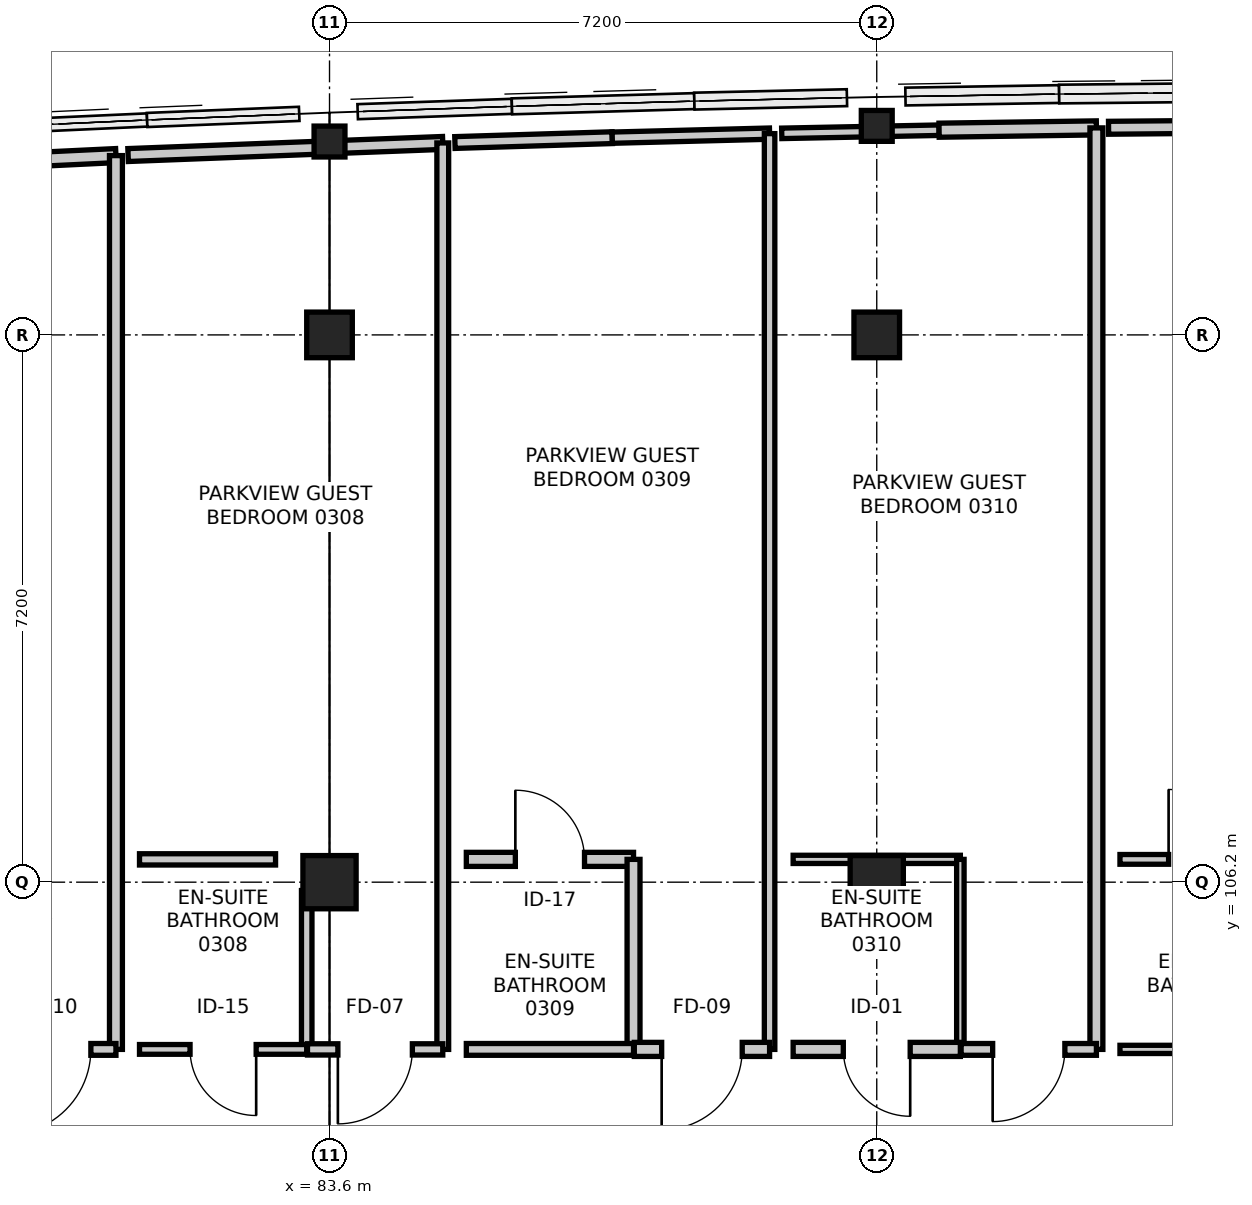
"""IFC4 building model, lengths in metres.
Left out: names, types, materials, properties, quantities, classifications, styles, units other than length and angle.
Written with IfcOpenShell. Run it as: python <this file> out.ifc"""

import sys

from ifc_helpers import new_model, si_unit, direction, frame, frame_2d, origin, origin_2d, place, context, subcontext, project, spatial, rectangle, hollow_circle, extrude, element, fill, save


model = new_model("IFC4")
c1 = context("Model", 3, precision=1e-05, world=origin(), true_north=direction((0.0, 1.0)))
c2 = subcontext(c1, "Body", "Model", "MODEL_VIEW")
j1 = project(units=[si_unit("LENGTHUNIT", "METRE"), si_unit("PLANEANGLEUNIT", "RADIAN")], contexts=[c1])
p1 = place(None, origin())
s1 = spatial("IfcSite", under=j1, at=p1, CompositionType="ELEMENT")
p2 = place(p1, origin())
s2 = spatial("IfcBuilding", under=s1, at=p2, CompositionType="ELEMENT")
p3 = place(p2, frame((0.0, 0.0, 15.0)))
s3 = spatial("IfcBuildingStorey", under=s2, at=p3, CompositionType="ELEMENT", Elevation=15.0)
p4 = place(p3, frame((83.6, 106.2, 0.0), z_axis=(0.0, 0.0, 1.0), x_axis=(1.0, 0.0, 0.0)))
e1 = element("IfcColumn", 1, at=p4, inside=s3, PredefinedType="COLUMN", context=c2, shape_type="SweptSolid", body=[
    extrude(rectangle(XDim=0.7, YDim=0.7, at=origin_2d()), origin(), (0.0, 0.0, 1.0), 4.2),
])
p5 = place(p3, frame((83.6, 113.4, 0.0), z_axis=(0.0, 0.0, 1.0), x_axis=(1.0, 0.0, 0.0)))
e2 = element("IfcColumn", 2, at=p5, inside=s3, PredefinedType="COLUMN", context=c2, shape_type="SweptSolid", body=[
    extrude(rectangle(XDim=0.6, YDim=0.6, at=origin_2d()), origin(), (0.0, 0.0, 1.0), 4.2),
])
p6 = place(p3, frame((83.6, 115.944, 0.0), z_axis=(0.0, 0.0, 1.0), x_axis=(1.0, 0.0, 0.0)))
e3 = element("IfcColumn", 3, at=p6, inside=s3, PredefinedType="COLUMN", context=c2, shape_type="SweptSolid", body=[
    extrude(hollow_circle(Radius=0.203, WallThickness=0.02, at=origin_2d()), origin(), (0.0, 0.0, 1.0), 4.2),
])
p7 = place(p3, frame((90.8, 106.2, 0.0), z_axis=(0.0, 0.0, 1.0), x_axis=(1.0, 0.0, 0.0)))
e4 = element("IfcColumn", 4, at=p7, inside=s3, PredefinedType="COLUMN", context=c2, shape_type="SweptSolid", body=[
    extrude(rectangle(XDim=0.7, YDim=0.7, at=origin_2d()), origin(), (0.0, 0.0, 1.0), 4.2),
])
p8 = place(p3, frame((90.8, 113.4, 0.0), z_axis=(0.0, 0.0, 1.0), x_axis=(1.0, 0.0, 0.0)))
e5 = element("IfcColumn", 5, at=p8, inside=s3, PredefinedType="COLUMN", context=c2, shape_type="SweptSolid", body=[
    extrude(rectangle(XDim=0.6, YDim=0.6, at=origin_2d()), origin(), (0.0, 0.0, 1.0), 4.2),
])
p9 = place(p3, frame((90.8, 116.15, 0.0), z_axis=(0.0, 0.0, 1.0), x_axis=(1.0, 0.0, 0.0)))
e6 = element("IfcColumn", 6, at=p9, inside=s3, PredefinedType="COLUMN", context=c2, shape_type="SweptSolid", body=[
    extrude(hollow_circle(Radius=0.203, WallThickness=0.02, at=origin_2d()), origin(), (0.0, 0.0, 1.0), 4.2),
])
p10 = place(p3, frame((77.01, 115.577, 0.0), z_axis=(0.0, 0.0, 1.0), x_axis=(0.998847761626, 0.047991135592, 0.0)))
e7 = element("IfcWall", 7, at=p10, inside=s3, PredefinedType="PARTITIONING", context=c2, shape_type="SweptSolid", body=[
    extrude(rectangle(XDim=3.785, YDim=0.185, at=frame_2d((1.893, 0.0))), origin(), (0.0, 0.0, 1.0), 3.516),
])
p11 = place(p3, frame((80.79, 115.759, 0.0), z_axis=(0.0, 0.0, 1.0), x_axis=(0.0, -1.0, 0.0)))
e8 = element("IfcWall", 8, at=p11, inside=s3, PredefinedType="PARTITIONING", context=c2, shape_type="SweptSolid", body=[
    extrude(rectangle(XDim=11.759, YDim=0.17, at=frame_2d((5.879, 0.0))), origin(), (0.0, 0.0, 1.0), 3.325),
])
p12 = place(p3, frame((80.79, 104.0, 0.0), z_axis=(0.0, 0.0, 1.0), x_axis=(-1.0, 0.0, 0.0)))
e9 = element("IfcWall", 9, at=p12, inside=s3, PredefinedType="PARTITIONING", context=c2, shape_type="SweptSolid", body=[
    extrude(rectangle(XDim=1.78, YDim=0.155, at=frame_2d((0.89, 0.0))), origin(), (0.0, 0.0, 1.0), 3.94),
])
p13 = place(p12, frame((0.33, 0.0, 0.0)))
e10 = element("IfcOpeningElement", 10, at=p13, cuts=e9, PredefinedType="OPENING", context=c2, shape_type="SweptSolid", body=[
    extrude(rectangle(XDim=1.12, YDim=2.2, at=frame_2d((0.56, 1.1))), frame((0.0, 0.087, 0.0), z_axis=(0.0, -1.0, 0.0), x_axis=(1.0, 0.0, 0.0)), (0.0, 0.0, 1.0), 0.175),
])
p14 = place(p3, frame((81.1, 106.5, 0.0), z_axis=(0.0, 0.0, 1.0), x_axis=(1.0, 0.0, 0.0)))
e11 = element("IfcWall", 11, at=p14, inside=s3, PredefinedType="PARTITIONING", context=c2, shape_type="SweptSolid", body=[
    extrude(rectangle(XDim=1.79, YDim=0.148, at=frame_2d((0.895, 0.0))), origin(), (0.0, 0.0, 1.0), 3.94),
])
p15 = place(p3, frame((83.3, 106.09, 0.0), z_axis=(0.0, 0.0, 1.0), x_axis=(0.0, -1.0, 0.0)))
e12 = element("IfcWall", 12, at=p15, inside=s3, PredefinedType="PARTITIONING", context=c2, shape_type="SweptSolid", body=[
    extrude(rectangle(XDim=2.09, YDim=0.138, at=frame_2d((1.045, 0.0))), origin(), (0.0, 0.0, 1.0), 3.275),
])
p16 = place(p3, frame((83.3, 104.0, 0.0), z_axis=(0.0, 0.0, 1.0), x_axis=(-1.0, 0.0, 0.0)))
e13 = element("IfcWall", 13, at=p16, inside=s3, PredefinedType="PARTITIONING", context=c2, shape_type="SweptSolid", body=[
    extrude(rectangle(XDim=2.2, YDim=0.128, at=frame_2d((1.1, 0.0))), origin(), (0.0, 0.0, 1.0), 3.94),
])
p17 = place(p16, frame((0.665, 0.0, 0.0)))
e14 = element("IfcOpeningElement", 14, at=p17, cuts=e13, PredefinedType="OPENING", context=c2, shape_type="SweptSolid", body=[
    extrude(rectangle(XDim=0.87, YDim=2.07, at=frame_2d((0.435, 1.035))), frame((0.0, 0.074, 0.0), z_axis=(0.0, -1.0, 0.0), x_axis=(1.0, 0.0, 0.0)), (0.0, 0.0, 1.0), 0.148),
])
p18 = place(p3, frame((80.95, 115.766, 0.0), z_axis=(0.0, 0.0, 1.0), x_axis=(0.999261696776, 0.03841954395, 0.0)))
e15 = element("IfcWall", 15, at=p18, inside=s3, PredefinedType="PARTITIONING", context=c2, shape_type="SweptSolid", body=[
    extrude(rectangle(XDim=4.143, YDim=0.17, at=frame_2d((2.072, 0.0))), origin(), (0.0, 0.0, 1.0), 3.516),
])
p19 = place(p3, frame((85.09, 115.926, 0.0), z_axis=(0.0, 0.0, 1.0), x_axis=(0.0, -1.0, 0.0)))
e16 = element("IfcWall", 16, at=p19, inside=s3, PredefinedType="PARTITIONING", context=c2, shape_type="SweptSolid", body=[
    extrude(rectangle(XDim=11.926, YDim=0.155, at=frame_2d((5.963, 0.0))), origin(), (0.0, 0.0, 1.0), 3.325),
])
p20 = place(p3, frame((85.09, 104.0, 0.0), z_axis=(0.0, 0.0, 1.0), x_axis=(-1.0, 0.0, 0.0)))
e17 = element("IfcWall", 17, at=p20, inside=s3, PredefinedType="PARTITIONING", context=c2, shape_type="SweptSolid", body=[
    extrude(rectangle(XDim=1.78, YDim=0.148, at=frame_2d((0.89, 0.0))), origin(), (0.0, 0.0, 1.0), 3.275),
])
p21 = place(p20, frame((0.4, 0.0, 0.0)))
e18 = element("IfcOpeningElement", 18, at=p21, cuts=e17, PredefinedType="OPENING", context=c2, shape_type="SweptSolid", body=[
    extrude(rectangle(XDim=0.98, YDim=2.15, at=frame_2d((0.49, 1.075))), frame((0.0, 0.084, 0.0), z_axis=(0.0, -1.0, 0.0), x_axis=(1.0, 0.0, 0.0)), (0.0, 0.0, 1.0), 0.168),
])
p22 = place(p3, frame((85.4, 106.5, 0.0), z_axis=(0.0, 0.0, 1.0), x_axis=(1.0, 0.0, 0.0)))
e19 = element("IfcWall", 19, at=p22, inside=s3, PredefinedType="PARTITIONING", context=c2, shape_type="SweptSolid", body=[
    extrude(rectangle(XDim=2.2, YDim=0.185, at=frame_2d((1.1, 0.0))), origin(), (0.0, 0.0, 1.0), 3.325),
])
p23 = place(p22, frame((0.645, 0.0, 0.0)))
e20 = element("IfcOpeningElement", 20, at=p23, cuts=e19, PredefinedType="OPENING", context=c2, shape_type="SweptSolid", body=[
    extrude(rectangle(XDim=0.91, YDim=2.11, at=frame_2d((0.455, 1.055))), frame((0.0, 0.103, 0.0), z_axis=(0.0, -1.0, 0.0), x_axis=(1.0, 0.0, 0.0)), (0.0, 0.0, 1.0), 0.205),
])
p24 = place(p3, frame((87.6, 106.5, 0.0), z_axis=(0.0, 0.0, 1.0), x_axis=(0.0, -1.0, 0.0)))
e21 = element("IfcWall", 21, at=p24, inside=s3, PredefinedType="PARTITIONING", context=c2, shape_type="SweptSolid", body=[
    extrude(rectangle(XDim=2.5, YDim=0.17, at=frame_2d((1.25, 0.0))), origin(), (0.0, 0.0, 1.0), 3.325),
])
p25 = place(p3, frame((87.6, 104.0, 0.0), z_axis=(0.0, 0.0, 1.0), x_axis=(-1.0, 0.0, 0.0)))
e22 = element("IfcWall", 22, at=p25, inside=s3, PredefinedType="PARTITIONING", context=c2, shape_type="SweptSolid", body=[
    extrude(rectangle(XDim=2.2, YDim=0.155, at=frame_2d((1.1, 0.0))), origin(), (0.0, 0.0, 1.0), 3.94),
])
p26 = place(p3, frame((85.25, 115.931, 0.0), z_axis=(0.0, 0.0, 1.0), x_axis=(0.999526572749, 0.030767358826, 0.0)))
e23 = element("IfcWall", 23, at=p26, inside=s3, PredefinedType="PARTITIONING", context=c2, shape_type="SweptSolid", body=[
    extrude(rectangle(XDim=2.071, YDim=0.155, at=frame_2d((1.036, 0.0))), origin(), (0.0, 0.0, 1.0), 3.516),
])
p27 = place(p3, frame((87.32, 115.995, 0.0), z_axis=(0.0, 0.0, 1.0), x_axis=(0.999666532025, 0.025822950049, 0.0)))
e24 = element("IfcWall", 24, at=p27, inside=s3, PredefinedType="PARTITIONING", context=c2, shape_type="SweptSolid", body=[
    extrude(rectangle(XDim=2.071, YDim=0.148, at=frame_2d((1.035, 0.0))), origin(), (0.0, 0.0, 1.0), 3.516),
])
p28 = place(p3, frame((89.39, 116.048, 0.0), z_axis=(0.0, 0.0, 1.0), x_axis=(0.0, -1.0, 0.0)))
e25 = element("IfcWall", 25, at=p28, inside=s3, PredefinedType="PARTITIONING", context=c2, shape_type="SweptSolid", body=[
    extrude(rectangle(XDim=12.048, YDim=0.138, at=frame_2d((6.024, 0.0))), origin(), (0.0, 0.0, 1.0), 3.325),
])
p29 = place(p3, frame((89.39, 104.0, 0.0), z_axis=(0.0, 0.0, 1.0), x_axis=(-1.0, 0.0, 0.0)))
e26 = element("IfcWall", 26, at=p29, inside=s3, PredefinedType="PARTITIONING", context=c2, shape_type="SweptSolid", body=[
    extrude(rectangle(XDim=1.78, YDim=0.185, at=frame_2d((0.89, 0.0))), origin(), (0.0, 0.0, 1.0), 3.94),
])
p30 = place(p29, frame((0.36, 0.0, 0.0)))
e27 = element("IfcOpeningElement", 27, at=p30, cuts=e26, PredefinedType="OPENING", context=c2, shape_type="SweptSolid", body=[
    extrude(rectangle(XDim=1.06, YDim=2.2, at=frame_2d((0.53, 1.1))), frame((0.0, 0.103, 0.0), z_axis=(0.0, -1.0, 0.0), x_axis=(1.0, 0.0, 0.0)), (0.0, 0.0, 1.0), 0.205),
])
p31 = place(p3, frame((89.7, 106.5, 0.0), z_axis=(0.0, 0.0, 1.0), x_axis=(1.0, 0.0, 0.0)))
e28 = element("IfcWall", 28, at=p31, inside=s3, PredefinedType="PARTITIONING", context=c2, shape_type="SweptSolid", body=[
    extrude(rectangle(XDim=2.2, YDim=0.108, at=frame_2d((1.1, 0.0))), origin(), (0.0, 0.0, 1.0), 3.275),
])
p32 = place(p3, frame((91.9, 106.5, 0.0), z_axis=(0.0, 0.0, 1.0), x_axis=(0.0, -1.0, 0.0)))
e29 = element("IfcWall", 29, at=p32, inside=s3, PredefinedType="PARTITIONING", context=c2, shape_type="SweptSolid", body=[
    extrude(rectangle(XDim=2.5, YDim=0.098, at=frame_2d((1.25, 0.0))), origin(), (0.0, 0.0, 1.0), 3.325),
])
p33 = place(p3, frame((91.9, 104.0, 0.0), z_axis=(0.0, 0.0, 1.0), x_axis=(-1.0, 0.0, 0.0)))
e30 = element("IfcWall", 30, at=p33, inside=s3, PredefinedType="PARTITIONING", context=c2, shape_type="SweptSolid", body=[
    extrude(rectangle(XDim=2.2, YDim=0.185, at=frame_2d((1.1, 0.0))), origin(), (0.0, 0.0, 1.0), 3.275),
])
p34 = place(p33, frame((0.66, 0.0, 0.0)))
e31 = element("IfcOpeningElement", 31, at=p34, cuts=e30, PredefinedType="OPENING", context=c2, shape_type="SweptSolid", body=[
    extrude(rectangle(XDim=0.88, YDim=2.06, at=frame_2d((0.44, 1.03))), frame((0.0, 0.103, 0.0), z_axis=(0.0, -1.0, 0.0), x_axis=(1.0, 0.0, 0.0)), (0.0, 0.0, 1.0), 0.205),
])
p35 = place(p3, frame((89.55, 116.052, 0.0), z_axis=(0.0, 0.0, 1.0), x_axis=(0.999799068667, 0.020045505564, 0.0)))
e32 = element("IfcWall", 32, at=p35, inside=s3, PredefinedType="PARTITIONING", context=c2, shape_type="SweptSolid", body=[
    extrude(rectangle(XDim=2.071, YDim=0.138, at=frame_2d((1.035, 0.0))), origin(), (0.0, 0.0, 1.0), 3.516),
])
p36 = place(p3, frame((91.62, 116.093, 0.0), z_axis=(0.0, 0.0, 1.0), x_axis=(0.99989132431, 0.014742441087, 0.0)))
e33 = element("IfcWall", 33, at=p36, inside=s3, PredefinedType="PARTITIONING", context=c2, shape_type="SweptSolid", body=[
    extrude(rectangle(XDim=2.07, YDim=0.185, at=frame_2d((1.035, 0.0))), origin(), (0.0, 0.0, 1.0), 3.516),
])
p37 = place(p3, frame((93.69, 116.124, 0.0), z_axis=(0.0, 0.0, 1.0), x_axis=(0.0, -1.0, 0.0)))
e34 = element("IfcWall", 34, at=p37, inside=s3, PredefinedType="PARTITIONING", context=c2, shape_type="SweptSolid", body=[
    extrude(rectangle(XDim=12.124, YDim=0.17, at=frame_2d((6.062, 0.0))), origin(), (0.0, 0.0, 1.0), 3.325),
])
p38 = place(p3, frame((93.69, 104.0, 0.0), z_axis=(0.0, 0.0, 1.0), x_axis=(-1.0, 0.0, 0.0)))
e35 = element("IfcWall", 35, at=p38, inside=s3, PredefinedType="PARTITIONING", context=c2, shape_type="SweptSolid", body=[
    extrude(rectangle(XDim=1.78, YDim=0.155, at=frame_2d((0.89, 0.0))), origin(), (0.0, 0.0, 1.0), 3.94),
])
p39 = place(p38, frame((0.415, 0.0, 0.0)))
e36 = element("IfcOpeningElement", 36, at=p39, cuts=e35, PredefinedType="OPENING", context=c2, shape_type="SweptSolid", body=[
    extrude(rectangle(XDim=0.95, YDim=2.1, at=frame_2d((0.475, 1.05))), frame((0.0, 0.087, 0.0), z_axis=(0.0, -1.0, 0.0), x_axis=(1.0, 0.0, 0.0)), (0.0, 0.0, 1.0), 0.175),
])
p40 = place(p3, frame((94.0, 106.5, 0.0), z_axis=(0.0, 0.0, 1.0), x_axis=(1.0, 0.0, 0.0)))
e37 = element("IfcWall", 37, at=p40, inside=s3, PredefinedType="PARTITIONING", context=c2, shape_type="SweptSolid", body=[
    extrude(rectangle(XDim=2.2, YDim=0.128, at=frame_2d((1.1, 0.0))), origin(), (0.0, 0.0, 1.0), 3.94),
])
p41 = place(p40, frame((0.64, 0.0, 0.0)))
e38 = element("IfcOpeningElement", 38, at=p41, cuts=e37, PredefinedType="OPENING", context=c2, shape_type="SweptSolid", body=[
    extrude(rectangle(XDim=0.92, YDim=2.1, at=frame_2d((0.46, 1.05))), frame((0.0, 0.074, 0.0), z_axis=(0.0, -1.0, 0.0), x_axis=(1.0, 0.0, 0.0)), (0.0, 0.0, 1.0), 0.148),
])
p42 = place(p3, frame((96.2, 104.0, 0.0), z_axis=(0.0, 0.0, 1.0), x_axis=(-1.0, 0.0, 0.0)))
e39 = element("IfcWall", 39, at=p42, inside=s3, PredefinedType="PARTITIONING", context=c2, shape_type="SweptSolid", body=[
    extrude(rectangle(XDim=2.2, YDim=0.108, at=frame_2d((1.1, 0.0))), origin(), (0.0, 0.0, 1.0), 3.94),
])
p43 = place(p3, frame((93.85, 116.125, 0.0), z_axis=(0.0, 0.0, 1.0), x_axis=(0.99996087267, 0.008846079907, 0.0)))
e40 = element("IfcWall", 40, at=p43, inside=s3, PredefinedType="PARTITIONING", context=c2, shape_type="SweptSolid", body=[
    extrude(rectangle(XDim=2.07, YDim=0.17, at=frame_2d((1.035, 0.0))), origin(), (0.0, 0.0, 1.0), 3.516),
])
p44 = place(p13, origin())
e41 = element("IfcDoor", 41, at=p44, inside=s3, OperationType="SINGLE_SWING_RIGHT", PredefinedType="DOOR", context=c2, shape_type="SweptSolid", body=[
    extrude(rectangle(XDim=1.12, YDim=2.2, at=frame_2d((0.56, 1.1))), frame((0.0, 0.025, 0.0), z_axis=(0.0, -1.0, 0.0), x_axis=(1.0, 0.0, 0.0)), (0.0, 0.0, 1.0), 0.05),
])
fill(e10, e41)
p45 = place(p17, origin())
e42 = element("IfcDoor", 42, at=p45, inside=s3, OperationType="SINGLE_SWING_LEFT", PredefinedType="DOOR", context=c2, shape_type="SweptSolid", body=[
    extrude(rectangle(XDim=0.87, YDim=2.07, at=frame_2d((0.435, 1.035))), frame((0.0, 0.025, 0.0), z_axis=(0.0, -1.0, 0.0), x_axis=(1.0, 0.0, 0.0)), (0.0, 0.0, 1.0), 0.05),
])
fill(e14, e42)
p46 = place(p21, origin())
e43 = element("IfcDoor", 43, at=p46, inside=s3, OperationType="SINGLE_SWING_RIGHT", PredefinedType="DOOR", context=c2, shape_type="SweptSolid", body=[
    extrude(rectangle(XDim=0.98, YDim=2.15, at=frame_2d((0.49, 1.075))), frame((0.0, 0.025, 0.0), z_axis=(0.0, -1.0, 0.0), x_axis=(1.0, 0.0, 0.0)), (0.0, 0.0, 1.0), 0.05),
])
fill(e18, e43)
p47 = place(p23, origin())
e44 = element("IfcDoor", 44, at=p47, inside=s3, OperationType="SINGLE_SWING_LEFT", PredefinedType="DOOR", context=c2, shape_type="SweptSolid", body=[
    extrude(rectangle(XDim=0.91, YDim=2.11, at=frame_2d((0.455, 1.055))), frame((0.0, 0.025, 0.0), z_axis=(0.0, -1.0, 0.0), x_axis=(1.0, 0.0, 0.0)), (0.0, 0.0, 1.0), 0.05),
])
fill(e20, e44)
p48 = place(p30, origin())
e45 = element("IfcDoor", 45, at=p48, inside=s3, OperationType="SINGLE_SWING_RIGHT", PredefinedType="DOOR", context=c2, shape_type="SweptSolid", body=[
    extrude(rectangle(XDim=1.06, YDim=2.2, at=frame_2d((0.53, 1.1))), frame((0.0, 0.025, 0.0), z_axis=(0.0, -1.0, 0.0), x_axis=(1.0, 0.0, 0.0)), (0.0, 0.0, 1.0), 0.05),
])
fill(e27, e45)
p49 = place(p34, origin())
e46 = element("IfcDoor", 46, at=p49, inside=s3, OperationType="SINGLE_SWING_LEFT", PredefinedType="DOOR", context=c2, shape_type="SweptSolid", body=[
    extrude(rectangle(XDim=0.88, YDim=2.06, at=frame_2d((0.44, 1.03))), frame((0.0, 0.025, 0.0), z_axis=(0.0, -1.0, 0.0), x_axis=(1.0, 0.0, 0.0)), (0.0, 0.0, 1.0), 0.05),
])
fill(e31, e46)
p50 = place(p39, origin())
e47 = element("IfcDoor", 47, at=p50, inside=s3, OperationType="SINGLE_SWING_RIGHT", PredefinedType="DOOR", context=c2, shape_type="SweptSolid", body=[
    extrude(rectangle(XDim=0.95, YDim=2.1, at=frame_2d((0.475, 1.05))), frame((0.0, 0.025, 0.0), z_axis=(0.0, -1.0, 0.0), x_axis=(1.0, 0.0, 0.0)), (0.0, 0.0, 1.0), 0.05),
])
fill(e36, e47)
p51 = place(p41, origin())
e48 = element("IfcDoor", 48, at=p51, inside=s3, OperationType="SINGLE_SWING_LEFT", PredefinedType="DOOR", context=c2, shape_type="SweptSolid", body=[
    extrude(rectangle(XDim=0.92, YDim=2.1, at=frame_2d((0.46, 1.05))), frame((0.0, 0.025, 0.0), z_axis=(0.0, -1.0, 0.0), x_axis=(1.0, 0.0, 0.0)), (0.0, 0.0, 1.0), 0.05),
])
fill(e38, e48)
save(model, sys.argv[1])
